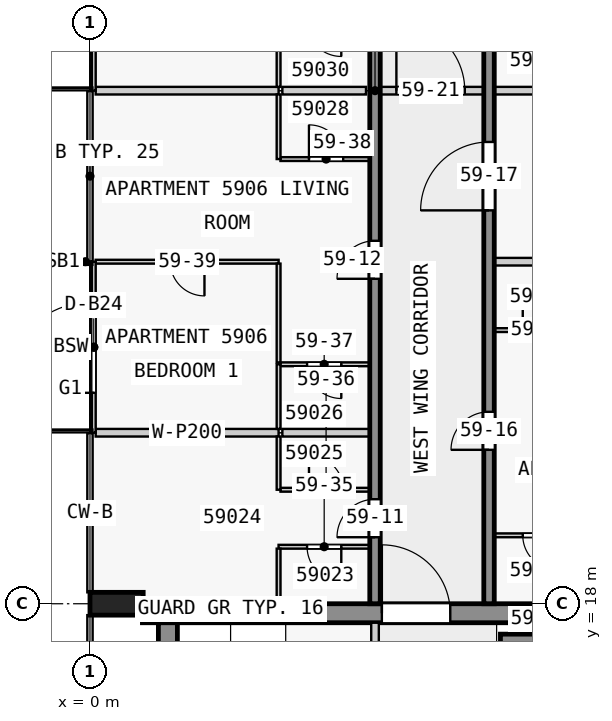
"""IFC4 building model, lengths in metres.
Left out: names, types, materials, properties, quantities, classifications, styles, units other than length and angle.
Written with IfcOpenShell. Run it as: python <this file> out.ifc"""

import sys

from ifc_helpers import new_model, si_unit, direction, frame, frame_2d, origin, origin_2d, place, context, subcontext, project, spatial, rectangle, extrude, element, fill, save


model = new_model("IFC4")
c1 = context("Model", 3, precision=1e-05, world=origin(), true_north=direction((0.0, 1.0)))
c2 = subcontext(c1, "Body", "Model", "MODEL_VIEW")
j1 = project(units=[si_unit("LENGTHUNIT", "METRE"), si_unit("PLANEANGLEUNIT", "RADIAN")], contexts=[c1])
p1 = place(None, origin())
s1 = spatial("IfcSite", under=j1, at=p1, CompositionType="ELEMENT")
p2 = place(p1, origin())
s2 = spatial("IfcBuilding", under=s1, at=p2, CompositionType="ELEMENT")
p3 = place(p2, frame((0.0, 0.0, 225.9)))
s3 = spatial("IfcBuildingStorey", under=s2, at=p3, CompositionType="ELEMENT", Elevation=225.9)
p4 = place(p3, frame((0.7, 18.0, 0.0), z_axis=(0.0, 0.0, 1.0), x_axis=(0.0, 1.0, 0.0)))
e1 = element("IfcColumn", 1, at=p4, inside=s3, PredefinedType="COLUMN", context=c2, shape_type="SweptSolid", body=[
    extrude(rectangle(XDim=0.6, YDim=1.4, at=origin_2d()), origin(), (0.0, 0.0, 1.0), 3.5),
])
p5 = place(p3, frame((1.38, 17.75, 0.0), z_axis=(0.0, 0.0, 1.0), x_axis=(1.0, 0.0, 0.0)))
e2 = element("IfcWall", 2, at=p5, inside=s3, PredefinedType="SHEAR", context=c2, shape_type="SweptSolid", body=[
    extrude(rectangle(XDim=21.12, YDim=0.5, at=frame_2d((10.56, 0.0))), origin(), (0.0, 0.0, 1.0), 3.05),
])
p6 = place(p5, frame((6.3, 0.0, 0.0)))
e3 = element("IfcOpeningElement", 3, at=p6, cuts=e2, PredefinedType="OPENING", context=c2, shape_type="SweptSolid", body=[
    extrude(rectangle(XDim=1.8, YDim=2.1, at=frame_2d((0.9, 1.05))), frame((0.0, 0.26, 0.0), z_axis=(0.0, -1.0, 0.0), x_axis=(1.0, 0.0, 0.0)), (0.0, 0.0, 1.0), 0.52),
])
p7 = place(p3, frame((2.05, 2.5, 0.0), z_axis=(0.0, 0.0, 1.0), x_axis=(0.0, 1.0, 0.0)))
e4 = element("IfcWall", 4, at=p7, inside=s3, PredefinedType="SHEAR", context=c2, shape_type="SweptSolid", body=[
    extrude(rectangle(XDim=15.0, YDim=0.5, at=frame_2d((7.5, 0.0))), origin(), (0.0, 0.0, 1.0), 3.05),
])
p8 = place(p3, frame((10.8, 17.05, 0.0), z_axis=(0.0, 0.0, 1.0), x_axis=(1.0, 0.0, 0.0)))
e5 = element("IfcWall", 5, at=p8, inside=s3, PredefinedType="SHEAR", context=c2, shape_type="SweptSolid", body=[
    extrude(rectangle(XDim=7.8, YDim=0.3, at=frame_2d((3.9, 0.0))), origin(), (0.0, 0.0, 1.0), 3.05),
])
p9 = place(p3, frame((7.5, 18.0, 0.0), z_axis=(0.0, 0.0, 1.0), x_axis=(0.0, 1.0, 0.0)))
e6 = element("IfcWall", 6, at=p9, inside=s3, PredefinedType="SHEAR", context=c2, shape_type="SweptSolid", body=[
    extrude(rectangle(XDim=27.0, YDim=0.275, at=frame_2d((13.5, 0.0))), origin(), (0.0, 0.0, 1.0), 3.05),
])
p10 = place(p9, frame((1.75, 0.0, 0.0)))
e7 = element("IfcOpeningElement", 7, at=p10, cuts=e6, PredefinedType="OPENING", context=c2, shape_type="SweptSolid", body=[
    extrude(rectangle(XDim=1.0, YDim=2.1, at=frame_2d((0.5, 1.05))), frame((0.0, 0.147, 0.0), z_axis=(0.0, -1.0, 0.0), x_axis=(1.0, 0.0, 0.0)), (0.0, 0.0, 1.0), 0.295),
])
p11 = place(p9, frame((8.55, 0.0, 0.0)))
e8 = element("IfcOpeningElement", 8, at=p11, cuts=e6, PredefinedType="OPENING", context=c2, shape_type="SweptSolid", body=[
    extrude(rectangle(XDim=1.0, YDim=2.1, at=frame_2d((0.5, 1.05))), frame((0.0, 0.147, 0.0), z_axis=(0.0, -1.0, 0.0), x_axis=(1.0, 0.0, 0.0)), (0.0, 0.0, 1.0), 0.295),
])
p12 = place(p9, frame((17.55, 0.0, 0.0)))
e9 = element("IfcOpeningElement", 9, at=p12, cuts=e6, PredefinedType="OPENING", context=c2, shape_type="SweptSolid", body=[
    extrude(rectangle(XDim=1.0, YDim=2.1, at=frame_2d((0.5, 1.05))), frame((0.0, 0.147, 0.0), z_axis=(0.0, -1.0, 0.0), x_axis=(1.0, 0.0, 0.0)), (0.0, 0.0, 1.0), 0.295),
])
p13 = place(p9, frame((23.25, 0.0, 0.0)))
e10 = element("IfcOpeningElement", 10, at=p13, cuts=e6, PredefinedType="OPENING", context=c2, shape_type="SweptSolid", body=[
    extrude(rectangle(XDim=0.9, YDim=2.1, at=frame_2d((0.45, 1.05))), frame((0.0, 0.147, 0.0), z_axis=(0.0, -1.0, 0.0), x_axis=(1.0, 0.0, 0.0)), (0.0, 0.0, 1.0), 0.295),
])
p14 = place(p9, frame((25.45, 0.0, 0.0)))
e11 = element("IfcOpeningElement", 11, at=p14, cuts=e6, PredefinedType="OPENING", context=c2, shape_type="SweptSolid", body=[
    extrude(rectangle(XDim=1.0, YDim=2.1, at=frame_2d((0.5, 1.05))), frame((0.0, 0.147, 0.0), z_axis=(0.0, -1.0, 0.0), x_axis=(1.0, 0.0, 0.0)), (0.0, 0.0, 1.0), 0.295),
])
p15 = place(p3, frame((10.5, 18.0, 0.0), z_axis=(0.0, 0.0, 1.0), x_axis=(0.0, 1.0, 0.0)))
e12 = element("IfcWall", 12, at=p15, inside=s3, PredefinedType="SHEAR", context=c2, shape_type="SweptSolid", body=[
    extrude(rectangle(XDim=27.0, YDim=0.275, at=frame_2d((13.5, 0.0))), origin(), (0.0, 0.0, 1.0), 3.05),
])
p16 = place(p15, frame((4.05, 0.0, 0.0)))
e13 = element("IfcOpeningElement", 13, at=p16, cuts=e12, PredefinedType="OPENING", context=c2, shape_type="SweptSolid", body=[
    extrude(rectangle(XDim=1.0, YDim=2.1, at=frame_2d((0.5, 1.05))), frame((0.0, 0.147, 0.0), z_axis=(0.0, -1.0, 0.0), x_axis=(1.0, 0.0, 0.0)), (0.0, 0.0, 1.0), 0.295),
])
p17 = place(p15, frame((10.35, 0.0, 0.0)))
e14 = element("IfcOpeningElement", 14, at=p17, cuts=e12, PredefinedType="OPENING", context=c2, shape_type="SweptSolid", body=[
    extrude(rectangle(XDim=1.8, YDim=2.1, at=frame_2d((0.9, 1.05))), frame((0.0, 0.147, 0.0), z_axis=(0.0, -1.0, 0.0), x_axis=(1.0, 0.0, 0.0)), (0.0, 0.0, 1.0), 0.295),
])
p18 = place(p15, frame((15.25, 0.0, 0.0)))
e15 = element("IfcOpeningElement", 15, at=p18, cuts=e12, PredefinedType="OPENING", context=c2, shape_type="SweptSolid", body=[
    extrude(rectangle(XDim=1.0, YDim=2.1, at=frame_2d((0.5, 1.05))), frame((0.0, 0.147, 0.0), z_axis=(0.0, -1.0, 0.0), x_axis=(1.0, 0.0, 0.0)), (0.0, 0.0, 1.0), 0.295),
])
p19 = place(p15, frame((21.35, 0.0, 0.0)))
e16 = element("IfcOpeningElement", 16, at=p19, cuts=e12, PredefinedType="OPENING", context=c2, shape_type="SweptSolid", body=[
    extrude(rectangle(XDim=1.0, YDim=2.1, at=frame_2d((0.5, 1.05))), frame((0.0, 0.147, 0.0), z_axis=(0.0, -1.0, 0.0), x_axis=(1.0, 0.0, 0.0)), (0.0, 0.0, 1.0), 0.295),
])
p20 = place(p3, frame((0.1, 22.5, 0.0), z_axis=(0.0, 0.0, 1.0), x_axis=(0.0, 1.0, 0.0)))
e17 = element("IfcWall", 17, at=p20, inside=s3, PredefinedType="STANDARD", context=c2, shape_type="SweptSolid", body=[
    extrude(rectangle(XDim=4.5, YDim=0.1, at=frame_2d((2.25, 0.0))), origin(), (0.0, 0.0, 1.0), 3.05),
])
p21 = place(p20, frame((1.05, 0.0, 0.0)))
e18 = element("IfcOpeningElement", 18, at=p21, cuts=e17, PredefinedType="OPENING", context=c2, shape_type="SweptSolid", body=[
    extrude(rectangle(XDim=2.4, YDim=2.4, at=frame_2d((1.2, 1.2))), frame((0.0, 0.06, 0.0), z_axis=(0.0, -1.0, 0.0), x_axis=(1.0, 0.0, 0.0)), (0.0, 0.0, 1.0), 0.12),
])
p22 = place(p3, frame((0.1, 31.5, 0.0), z_axis=(0.0, 0.0, 1.0), x_axis=(0.0, 1.0, 0.0)))
e19 = element("IfcWall", 19, at=p22, inside=s3, PredefinedType="STANDARD", context=c2, shape_type="SweptSolid", body=[
    extrude(rectangle(XDim=4.5, YDim=0.1, at=frame_2d((2.25, 0.0))), origin(), (0.0, 0.0, 1.0), 3.05),
])
p23 = place(p22, frame((1.05, 0.0, 0.0)))
e20 = element("IfcOpeningElement", 20, at=p23, cuts=e19, PredefinedType="OPENING", context=c2, shape_type="SweptSolid", body=[
    extrude(rectangle(XDim=2.4, YDim=2.4, at=frame_2d((1.2, 1.2))), frame((0.0, 0.06, 0.0), z_axis=(0.0, -1.0, 0.0), x_axis=(1.0, 0.0, 0.0)), (0.0, 0.0, 1.0), 0.12),
])
p24 = place(p3, frame((7.5, 10.1, 0.0), z_axis=(0.0, 0.0, 1.0), x_axis=(0.0, 1.0, 0.0)))
e21 = element("IfcWall", 21, at=p24, inside=s3, PredefinedType="PARTITIONING", context=c2, shape_type="SweptSolid", body=[
    extrude(rectangle(XDim=7.4, YDim=0.2, at=frame_2d((3.7, 0.0))), origin(), (0.0, 0.0, 1.0), 3.05),
])
p25 = place(p24, frame((1.05, 0.0, 0.0)))
e22 = element("IfcOpeningElement", 22, at=p25, cuts=e21, PredefinedType="OPENING", context=c2, shape_type="SweptSolid", body=[
    extrude(rectangle(XDim=0.9, YDim=2.1, at=frame_2d((0.45, 1.05))), frame((0.0, 0.11, 0.0), z_axis=(0.0, -1.0, 0.0), x_axis=(1.0, 0.0, 0.0)), (0.0, 0.0, 1.0), 0.22),
])
p26 = place(p24, frame((4.75, 0.0, 0.0)))
e23 = element("IfcOpeningElement", 23, at=p26, cuts=e21, PredefinedType="OPENING", context=c2, shape_type="SweptSolid", body=[
    extrude(rectangle(XDim=0.9, YDim=2.1, at=frame_2d((0.45, 1.05))), frame((0.0, 0.11, 0.0), z_axis=(0.0, -1.0, 0.0), x_axis=(1.0, 0.0, 0.0)), (0.0, 0.0, 1.0), 0.22),
])
p27 = place(p3, frame((7.363, 19.5, 0.0), z_axis=(0.0, 0.0, 1.0), x_axis=(-1.0, 0.0, 0.0)))
e24 = element("IfcWall", 24, at=p27, inside=s3, PredefinedType="PARTITIONING", context=c2, shape_type="SweptSolid", body=[
    extrude(rectangle(XDim=2.4, YDim=0.1, at=frame_2d((1.2, 0.0))), origin(), (0.0, 0.0, 1.0), 3.05),
])
p28 = place(p27, frame((0.75, 0.0, 0.0)))
e25 = element("IfcOpeningElement", 25, at=p28, cuts=e24, PredefinedType="OPENING", context=c2, shape_type="SweptSolid", body=[
    extrude(rectangle(XDim=0.9, YDim=2.1, at=frame_2d((0.45, 1.05))), frame((0.0, 0.06, 0.0), z_axis=(0.0, -1.0, 0.0), x_axis=(1.0, 0.0, 0.0)), (0.0, 0.0, 1.0), 0.12),
])
p29 = place(p3, frame((13.038, 19.8, 0.0), z_axis=(0.0, 0.0, 1.0), x_axis=(-1.0, 0.0, 0.0)))
e26 = element("IfcWall", 26, at=p29, inside=s3, PredefinedType="PARTITIONING", context=c2, shape_type="SweptSolid", body=[
    extrude(rectangle(XDim=2.4, YDim=0.1, at=frame_2d((1.2, 0.0))), origin(), (0.0, 0.0, 1.0), 3.05),
])
p30 = place(p29, frame((0.75, 0.0, 0.0)))
e27 = element("IfcOpeningElement", 27, at=p30, cuts=e26, PredefinedType="OPENING", context=c2, shape_type="SweptSolid", body=[
    extrude(rectangle(XDim=0.9, YDim=2.1, at=frame_2d((0.45, 1.05))), frame((0.0, 0.06, 0.0), z_axis=(0.0, -1.0, 0.0), x_axis=(1.0, 0.0, 0.0)), (0.0, 0.0, 1.0), 0.12),
])
p31 = place(p3, frame((5.012, 21.0, 0.0), z_axis=(0.0, 0.0, 1.0), x_axis=(1.0, 0.0, 0.0)))
e28 = element("IfcWall", 28, at=p31, inside=s3, PredefinedType="PARTITIONING", context=c2, shape_type="SweptSolid", body=[
    extrude(rectangle(XDim=2.35, YDim=0.1, at=frame_2d((1.175, 0.0))), origin(), (0.0, 0.0, 1.0), 3.05),
])
p32 = place(p31, frame((0.75, 0.0, 0.0)))
e29 = element("IfcOpeningElement", 29, at=p32, cuts=e28, PredefinedType="OPENING", context=c2, shape_type="SweptSolid", body=[
    extrude(rectangle(XDim=0.9, YDim=2.1, at=frame_2d((0.45, 1.05))), frame((0.0, 0.06, 0.0), z_axis=(0.0, -1.0, 0.0), x_axis=(1.0, 0.0, 0.0)), (0.0, 0.0, 1.0), 0.12),
])
p33 = place(p3, frame((7.363, 22.5, 0.0), z_axis=(0.0, 0.0, 1.0), x_axis=(-1.0, 0.0, 0.0)))
e30 = element("IfcWall", 30, at=p33, inside=s3, PredefinedType="PARTITIONING", context=c2, shape_type="SweptSolid", body=[
    extrude(rectangle(XDim=2.3, YDim=0.2, at=frame_2d((1.15, 0.0))), origin(), (0.0, 0.0, 1.0), 3.05),
])
p34 = place(p3, frame((0.15, 22.5, 0.0), z_axis=(0.0, 0.0, 1.0), x_axis=(1.0, 0.0, 0.0)))
e31 = element("IfcWall", 31, at=p34, inside=s3, PredefinedType="PARTITIONING", context=c2, shape_type="SweptSolid", body=[
    extrude(rectangle(XDim=4.812, YDim=0.2, at=frame_2d((2.406, 0.0))), origin(), (0.0, 0.0, 1.0), 3.05),
])
p35 = place(p3, frame((7.363, 24.3, 0.0), z_axis=(0.0, 0.0, 1.0), x_axis=(-1.0, 0.0, 0.0)))
e32 = element("IfcWall", 32, at=p35, inside=s3, PredefinedType="PARTITIONING", context=c2, shape_type="SweptSolid", body=[
    extrude(rectangle(XDim=2.35, YDim=0.1, at=frame_2d((1.175, 0.0))), origin(), (0.0, 0.0, 1.0), 3.05),
])
p36 = place(p35, frame((0.75, 0.0, 0.0)))
e33 = element("IfcOpeningElement", 33, at=p36, cuts=e32, PredefinedType="OPENING", context=c2, shape_type="SweptSolid", body=[
    extrude(rectangle(XDim=0.9, YDim=2.1, at=frame_2d((0.45, 1.05))), frame((0.0, 0.06, 0.0), z_axis=(0.0, -1.0, 0.0), x_axis=(1.0, 0.0, 0.0)), (0.0, 0.0, 1.0), 0.12),
])
p37 = place(p3, frame((10.637, 25.2, 0.0), z_axis=(0.0, 0.0, 1.0), x_axis=(1.0, 0.0, 0.0)))
e34 = element("IfcWall", 34, at=p37, inside=s3, PredefinedType="PARTITIONING", context=c2, shape_type="SweptSolid", body=[
    extrude(rectangle(XDim=2.35, YDim=0.1, at=frame_2d((1.175, 0.0))), origin(), (0.0, 0.0, 1.0), 3.05),
])
p38 = place(p37, frame((0.75, 0.0, 0.0)))
e35 = element("IfcOpeningElement", 35, at=p38, cuts=e34, PredefinedType="OPENING", context=c2, shape_type="SweptSolid", body=[
    extrude(rectangle(XDim=0.9, YDim=2.1, at=frame_2d((0.45, 1.05))), frame((0.0, 0.06, 0.0), z_axis=(0.0, -1.0, 0.0), x_axis=(1.0, 0.0, 0.0)), (0.0, 0.0, 1.0), 0.12),
])
p39 = place(p3, frame((4.962, 27.0, 0.0), z_axis=(0.0, 0.0, 1.0), x_axis=(-1.0, 0.0, 0.0)))
e36 = element("IfcWall", 36, at=p39, inside=s3, PredefinedType="PARTITIONING", context=c2, shape_type="SweptSolid", body=[
    extrude(rectangle(XDim=4.812, YDim=0.1, at=frame_2d((2.406, 0.0))), origin(), (0.0, 0.0, 1.0), 3.05),
])
p40 = place(p39, frame((1.95, 0.0, 0.0)))
e37 = element("IfcOpeningElement", 37, at=p40, cuts=e36, PredefinedType="OPENING", context=c2, shape_type="SweptSolid", body=[
    extrude(rectangle(XDim=0.9, YDim=2.1, at=frame_2d((0.45, 1.05))), frame((0.0, 0.06, 0.0), z_axis=(0.0, -1.0, 0.0), x_axis=(1.0, 0.0, 0.0)), (0.0, 0.0, 1.0), 0.12),
])
p41 = place(p3, frame((17.85, 27.0, 0.0), z_axis=(0.0, 0.0, 1.0), x_axis=(-1.0, 0.0, 0.0)))
e38 = element("IfcWall", 38, at=p41, inside=s3, PredefinedType="PARTITIONING", context=c2, shape_type="SweptSolid", body=[
    extrude(rectangle(XDim=7.213, YDim=0.2, at=frame_2d((3.606, 0.0))), origin(), (0.0, 0.0, 1.0), 3.05),
])
p42 = place(p3, frame((5.012, 29.7, 0.0), z_axis=(0.0, 0.0, 1.0), x_axis=(1.0, 0.0, 0.0)))
e39 = element("IfcWall", 39, at=p42, inside=s3, PredefinedType="PARTITIONING", context=c2, shape_type="SweptSolid", body=[
    extrude(rectangle(XDim=2.35, YDim=0.1, at=frame_2d((1.175, 0.0))), origin(), (0.0, 0.0, 1.0), 3.05),
])
p43 = place(p42, frame((0.75, 0.0, 0.0)))
e40 = element("IfcOpeningElement", 40, at=p43, cuts=e39, PredefinedType="OPENING", context=c2, shape_type="SweptSolid", body=[
    extrude(rectangle(XDim=0.9, YDim=2.1, at=frame_2d((0.45, 1.05))), frame((0.0, 0.06, 0.0), z_axis=(0.0, -1.0, 0.0), x_axis=(1.0, 0.0, 0.0)), (0.0, 0.0, 1.0), 0.12),
])
p44 = place(p3, frame((7.262, 31.5, 0.0), z_axis=(0.0, 0.0, 1.0), x_axis=(-1.0, 0.0, 0.0)))
e41 = element("IfcWall", 41, at=p44, inside=s3, PredefinedType="PARTITIONING", context=c2, shape_type="SweptSolid", body=[
    extrude(rectangle(XDim=2.2, YDim=0.2, at=frame_2d((1.1, 0.0))), origin(), (0.0, 0.0, 1.0), 3.05),
])
p45 = place(p3, frame((17.85, 31.5, 0.0), z_axis=(0.0, 0.0, 1.0), x_axis=(-1.0, 0.0, 0.0)))
e42 = element("IfcWall", 42, at=p45, inside=s3, PredefinedType="PARTITIONING", context=c2, shape_type="SweptSolid", body=[
    extrude(rectangle(XDim=7.213, YDim=0.2, at=frame_2d((3.606, 0.0))), origin(), (0.0, 0.0, 1.0), 3.05),
])
p46 = place(p3, frame((0.15, 31.5, 0.0), z_axis=(0.0, 0.0, 1.0), x_axis=(1.0, 0.0, 0.0)))
e43 = element("IfcWall", 43, at=p46, inside=s3, PredefinedType="PARTITIONING", context=c2, shape_type="SweptSolid", body=[
    extrude(rectangle(XDim=4.812, YDim=0.2, at=frame_2d((2.406, 0.0))), origin(), (0.0, 0.0, 1.0), 3.05),
])
p47 = place(p3, frame((4.962, 19.45, 0.0), z_axis=(0.0, 0.0, 1.0), x_axis=(0.0, -1.0, 0.0)))
e44 = element("IfcWall", 44, at=p47, inside=s3, PredefinedType="PARTITIONING", context=c2, shape_type="SweptSolid", body=[
    extrude(rectangle(XDim=1.45, YDim=0.1, at=frame_2d((0.725, 0.0))), origin(), (0.0, 0.0, 1.0), 3.05),
])
p48 = place(p3, frame((4.962, 22.4, 0.0), z_axis=(0.0, 0.0, 1.0), x_axis=(0.0, -1.0, 0.0)))
e45 = element("IfcWall", 45, at=p48, inside=s3, PredefinedType="PARTITIONING", context=c2, shape_type="SweptSolid", body=[
    extrude(rectangle(XDim=1.4, YDim=0.1, at=frame_2d((0.7, 0.0))), origin(), (0.0, 0.0, 1.0), 3.05),
])
for number, where, z_axis, x_axis in (
    (46, (4.962, 24.3, 0.0), (0.0, 0.0, 1.0), (0.0, -1.0, 0.0)),
    (47, (4.962, 31.4, 0.0), (0.0, 0.0, 1.0), (0.0, -1.0, 0.0)),
    (48, (4.962, 33.3, 0.0), (0.0, 0.0, 1.0), (0.0, -1.0, 0.0)),
):
    element("IfcWall", number, at=place(p3, frame(where, z_axis=z_axis, x_axis=x_axis)), inside=s3, PredefinedType="PARTITIONING", context=c2, shape_type="SweptSolid", body=[
        extrude(rectangle(XDim=1.7, YDim=0.1, at=frame_2d((0.85, 0.0))), origin(), (0.0, 0.0, 1.0), 3.05),
    ])
p49 = place(p3, frame((4.962, 24.35, 0.0), z_axis=(0.0, 0.0, 1.0), x_axis=(0.0, 1.0, 0.0)))
e49 = element("IfcWall", 49, at=p49, inside=s3, PredefinedType="PARTITIONING", context=c2, shape_type="SweptSolid", body=[
    extrude(rectangle(XDim=2.6, YDim=0.1, at=frame_2d((1.3, 0.0))), origin(), (0.0, 0.0, 1.0), 3.05),
])
p50 = place(p3, frame((7.363, 31.5, 0.0), z_axis=(0.0, 0.0, 1.0), x_axis=(1.0, 0.0, 0.0)))
e50 = element("IfcWall", 50, at=p50, inside=s3, PredefinedType="PARTITIONING", context=c2, shape_type="SweptSolid", body=[
    extrude(rectangle(XDim=3.175, YDim=0.2, at=frame_2d((1.587, 0.0))), origin(), (0.0, 0.0, 1.0), 3.05),
])
p51 = place(p50, frame((0.7, 0.0, 0.0)))
e51 = element("IfcOpeningElement", 51, at=p51, cuts=e50, PredefinedType="OPENING", context=c2, shape_type="SweptSolid", body=[
    extrude(rectangle(XDim=1.8, YDim=2.1, at=frame_2d((0.9, 1.05))), frame((0.0, 0.11, 0.0), z_axis=(0.0, -1.0, 0.0), x_axis=(1.0, 0.0, 0.0)), (0.0, 0.0, 1.0), 0.22),
])
p52 = place(p21, origin())
e52 = element("IfcDoor", 52, at=p52, inside=s3, OperationType="SINGLE_SWING_LEFT", PredefinedType="DOOR", context=c2, shape_type="SweptSolid", body=[
    extrude(rectangle(XDim=2.4, YDim=2.4, at=frame_2d((1.2, 1.2))), frame((0.0, 0.025, 0.0), z_axis=(0.0, -1.0, 0.0), x_axis=(1.0, 0.0, 0.0)), (0.0, 0.0, 1.0), 0.05),
])
fill(e18, e52)
p53 = place(p6, origin())
e53 = element("IfcDoor", 53, at=p53, inside=s3, OperationType="DOUBLE_DOOR_SINGLE_SWING", PredefinedType="DOOR", context=c2, shape_type="SweptSolid", body=[
    extrude(rectangle(XDim=1.8, YDim=2.1, at=frame_2d((0.9, 1.05))), frame((0.0, 0.025, 0.0), z_axis=(0.0, -1.0, 0.0), x_axis=(1.0, 0.0, 0.0)), (0.0, 0.0, 1.0), 0.05),
])
fill(e3, e53)
p54 = place(p10, origin())
e54 = element("IfcDoor", 54, at=p54, inside=s3, OperationType="SINGLE_SWING_LEFT", PredefinedType="DOOR", context=c2, shape_type="SweptSolid", body=[
    extrude(rectangle(XDim=1.0, YDim=2.1, at=frame_2d((0.5, 1.05))), frame((0.0, 0.025, 0.0), z_axis=(0.0, -1.0, 0.0), x_axis=(1.0, 0.0, 0.0)), (0.0, 0.0, 1.0), 0.05),
])
fill(e7, e54)
p55 = place(p11, origin())
e55 = element("IfcDoor", 55, at=p55, inside=s3, OperationType="SINGLE_SWING_LEFT", PredefinedType="DOOR", context=c2, shape_type="SweptSolid", body=[
    extrude(rectangle(XDim=1.0, YDim=2.1, at=frame_2d((0.5, 1.05))), frame((0.0, 0.025, 0.0), z_axis=(0.0, -1.0, 0.0), x_axis=(1.0, 0.0, 0.0)), (0.0, 0.0, 1.0), 0.05),
])
fill(e8, e55)
p56 = place(p16, origin())
e56 = element("IfcDoor", 56, at=p56, inside=s3, OperationType="SINGLE_SWING_LEFT", PredefinedType="DOOR", context=c2, shape_type="SweptSolid", body=[
    extrude(rectangle(XDim=1.0, YDim=2.1, at=frame_2d((0.5, 1.05))), frame((0.0, 0.025, 0.0), z_axis=(0.0, -1.0, 0.0), x_axis=(1.0, 0.0, 0.0)), (0.0, 0.0, 1.0), 0.05),
])
fill(e13, e56)
p57 = place(p17, origin())
e57 = element("IfcDoor", 57, at=p57, inside=s3, OperationType="SINGLE_SWING_LEFT", PredefinedType="DOOR", context=c2, shape_type="SweptSolid", body=[
    extrude(rectangle(XDim=1.8, YDim=2.1, at=frame_2d((0.9, 1.05))), frame((0.0, 0.025, 0.0), z_axis=(0.0, -1.0, 0.0), x_axis=(1.0, 0.0, 0.0)), (0.0, 0.0, 1.0), 0.05),
])
fill(e14, e57)
p58 = place(p51, origin())
e58 = element("IfcDoor", 58, at=p58, inside=s3, OperationType="SINGLE_SWING_RIGHT", PredefinedType="DOOR", context=c2, shape_type="SweptSolid", body=[
    extrude(rectangle(XDim=1.8, YDim=2.1, at=frame_2d((0.9, 1.05))), frame((0.0, 0.025, 0.0), z_axis=(0.0, -1.0, 0.0), x_axis=(1.0, 0.0, 0.0)), (0.0, 0.0, 1.0), 0.05),
])
fill(e51, e58)
p59 = place(p28, origin())
e59 = element("IfcDoor", 59, at=p59, inside=s3, OperationType="SINGLE_SWING_RIGHT", PredefinedType="DOOR", context=c2, shape_type="SweptSolid", body=[
    extrude(rectangle(XDim=0.9, YDim=2.1, at=frame_2d((0.45, 1.05))), frame((0.0, 0.025, 0.0), z_axis=(0.0, -1.0, 0.0), x_axis=(1.0, 0.0, 0.0)), (0.0, 0.0, 1.0), 0.05),
])
fill(e25, e59)
p60 = place(p32, origin())
e60 = element("IfcDoor", 60, at=p60, inside=s3, OperationType="SINGLE_SWING_RIGHT", PredefinedType="DOOR", context=c2, shape_type="SweptSolid", body=[
    extrude(rectangle(XDim=0.9, YDim=2.1, at=frame_2d((0.45, 1.05))), frame((0.0, 0.025, 0.0), z_axis=(0.0, -1.0, 0.0), x_axis=(1.0, 0.0, 0.0)), (0.0, 0.0, 1.0), 0.05),
])
fill(e29, e60)
p61 = place(p36, origin())
e61 = element("IfcDoor", 61, at=p61, inside=s3, OperationType="SINGLE_SWING_RIGHT", PredefinedType="DOOR", context=c2, shape_type="SweptSolid", body=[
    extrude(rectangle(XDim=0.9, YDim=2.1, at=frame_2d((0.45, 1.05))), frame((0.0, 0.025, 0.0), z_axis=(0.0, -1.0, 0.0), x_axis=(1.0, 0.0, 0.0)), (0.0, 0.0, 1.0), 0.05),
])
fill(e33, e61)
p62 = place(p43, origin())
e62 = element("IfcDoor", 62, at=p62, inside=s3, OperationType="SINGLE_SWING_RIGHT", PredefinedType="DOOR", context=c2, shape_type="SweptSolid", body=[
    extrude(rectangle(XDim=0.9, YDim=2.1, at=frame_2d((0.45, 1.05))), frame((0.0, 0.025, 0.0), z_axis=(0.0, -1.0, 0.0), x_axis=(1.0, 0.0, 0.0)), (0.0, 0.0, 1.0), 0.05),
])
fill(e40, e62)
p63 = place(p40, origin())
e63 = element("IfcDoor", 63, at=p63, inside=s3, OperationType="SINGLE_SWING_LEFT", PredefinedType="DOOR", context=c2, shape_type="SweptSolid", body=[
    extrude(rectangle(XDim=0.9, YDim=2.1, at=frame_2d((0.45, 1.05))), frame((0.0, 0.025, 0.0), z_axis=(0.0, -1.0, 0.0), x_axis=(1.0, 0.0, 0.0)), (0.0, 0.0, 1.0), 0.05),
])
fill(e37, e63)
p64 = place(p30, origin())
e64 = element("IfcDoor", 64, at=p64, inside=s3, OperationType="SINGLE_SWING_LEFT", PredefinedType="DOOR", context=c2, shape_type="SweptSolid", body=[
    extrude(rectangle(XDim=0.9, YDim=2.1, at=frame_2d((0.45, 1.05))), frame((0.0, 0.025, 0.0), z_axis=(0.0, -1.0, 0.0), x_axis=(1.0, 0.0, 0.0)), (0.0, 0.0, 1.0), 0.05),
])
fill(e27, e64)
p65 = place(p38, origin())
e65 = element("IfcDoor", 65, at=p65, inside=s3, OperationType="SINGLE_SWING_RIGHT", PredefinedType="DOOR", context=c2, shape_type="SweptSolid", body=[
    extrude(rectangle(XDim=0.9, YDim=2.1, at=frame_2d((0.45, 1.05))), frame((0.0, 0.025, 0.0), z_axis=(0.0, -1.0, 0.0), x_axis=(1.0, 0.0, 0.0)), (0.0, 0.0, 1.0), 0.05),
])
fill(e35, e65)
save(model, sys.argv[1])
